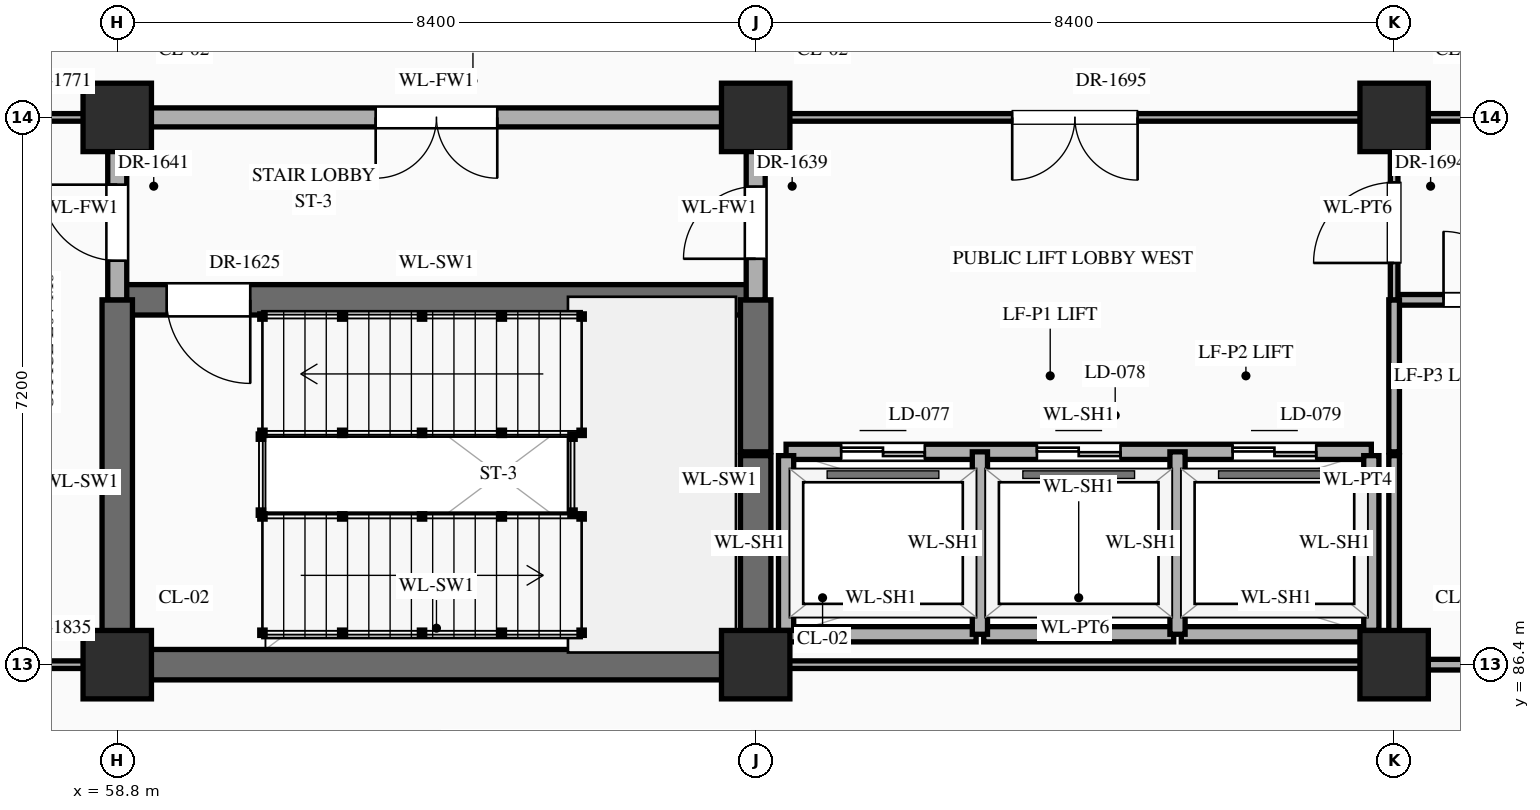
"""IFC4 building model, lengths in metres.
Left out: names, types, materials, properties, quantities, classifications, styles, units other than length and angle.
Written with IfcOpenShell. Run it as: python <this file> out.ifc"""

import sys

from ifc_helpers import new_model, si_unit, direction, frame, frame_2d, origin, origin_2d, place, context, subcontext, project, spatial, rectangle, extrude, element, fill, save


model = new_model("IFC4")
c1 = context("Model", 3, precision=1e-05, world=origin(), true_north=direction((0.0, 1.0)))
c2 = subcontext(c1, "Body", "Model", "MODEL_VIEW")
j1 = project(units=[si_unit("LENGTHUNIT", "METRE"), si_unit("PLANEANGLEUNIT", "RADIAN")], contexts=[c1])
p1 = place(None, origin())
s1 = spatial("IfcSite", under=j1, at=p1, CompositionType="ELEMENT")
p2 = place(p1, origin())
s2 = spatial("IfcBuilding", under=s1, at=p2, CompositionType="ELEMENT")
p3 = place(p2, frame((0.0, 0.0, 16.2)))
s3 = spatial("IfcBuildingStorey", under=s2, at=p3, CompositionType="ELEMENT", Elevation=16.2)
for number, where, z_axis, x_axis in (
    (1, (58.8, 86.4, 0.0), (0.0, 0.0, 1.0), (1.0, 0.0, 0.0)),
    (2, (58.8, 93.6, 0.0), (0.0, 0.0, 1.0), (1.0, 0.0, 0.0)),
    (3, (67.2, 86.4, 0.0), (0.0, 0.0, 1.0), (1.0, 0.0, 0.0)),
    (4, (67.2, 93.6, 0.0), (0.0, 0.0, 1.0), (1.0, 0.0, 0.0)),
    (5, (75.6, 86.4, 0.0), (0.0, 0.0, 1.0), (1.0, 0.0, 0.0)),
    (6, (75.6, 93.6, 0.0), (0.0, 0.0, 1.0), (1.0, 0.0, 0.0)),
):
    element("IfcColumn", number, at=place(p3, frame(where, z_axis=z_axis, x_axis=x_axis)), inside=s3, PredefinedType="COLUMN", context=c2, shape_type="SweptSolid", body=[
        extrude(rectangle(XDim=0.9, YDim=0.9, at=origin_2d()), origin(), (0.0, 0.0, 1.0), 5.4),
    ])
p4 = place(p3, frame((50.4, 86.4, 0.0), z_axis=(0.0, 0.0, 1.0), x_axis=(1.0, 0.0, 0.0)))
e7 = element("IfcWall", 7, at=p4, inside=s3, PredefinedType="STANDARD", context=c2, shape_type="SweptSolid", body=[
    extrude(rectangle(XDim=8.4, YDim=0.1, at=frame_2d((4.2, 0.0))), origin(), (0.0, 0.0, 1.0), 4.27),
])
p5 = place(p4, frame((1.135, 0.0, 0.0)))
e8 = element("IfcOpeningElement", 8, at=p5, cuts=e7, PredefinedType="OPENING", context=c2, shape_type="SweptSolid", body=[
    extrude(rectangle(XDim=0.9, YDim=2.15, at=frame_2d((0.45, 1.075))), frame((0.0, 0.062, 0.0), z_axis=(0.0, -1.0, 0.0), x_axis=(1.0, 0.0, 0.0)), (0.0, 0.0, 1.0), 0.124),
])
p6 = place(p4, frame((3.74, 0.0, 0.0)))
e9 = element("IfcOpeningElement", 9, at=p6, cuts=e7, PredefinedType="OPENING", context=c2, shape_type="SweptSolid", body=[
    extrude(rectangle(XDim=0.92, YDim=2.15, at=frame_2d((0.46, 1.075))), frame((0.0, 0.062, 0.0), z_axis=(0.0, -1.0, 0.0), x_axis=(1.0, 0.0, 0.0)), (0.0, 0.0, 1.0), 0.124),
])
p7 = place(p4, frame((6.335, 0.0, 0.0)))
e10 = element("IfcOpeningElement", 10, at=p7, cuts=e7, PredefinedType="OPENING", context=c2, shape_type="SweptSolid", body=[
    extrude(rectangle(XDim=0.96, YDim=2.2, at=frame_2d((0.48, 1.1))), frame((0.0, 0.062, 0.0), z_axis=(0.0, -1.0, 0.0), x_axis=(1.0, 0.0, 0.0)), (0.0, 0.0, 1.0), 0.124),
])
p8 = place(p3, frame((58.8, 86.4, 0.0), z_axis=(0.0, 0.0, 1.0), x_axis=(1.0, 0.0, 0.0)))
e11 = element("IfcWall", 11, at=p8, inside=s3, PredefinedType="SHEAR", context=c2, shape_type="SweptSolid", body=[
    extrude(rectangle(XDim=8.4, YDim=0.4, at=frame_2d((4.2, 0.0))), origin(), (0.0, 0.0, 1.0), 5.12),
])
p9 = place(p3, frame((67.25, 86.4, 0.0), z_axis=(0.0, 0.0, 1.0), x_axis=(1.0, 0.0, 0.0)))
e12 = element("IfcWall", 12, at=p9, inside=s3, PredefinedType="STANDARD", context=c2, shape_type="SweptSolid", body=[
    extrude(rectangle(XDim=8.3, YDim=0.1, at=frame_2d((4.15, 0.0))), origin(), (0.0, 0.0, 1.0), 4.27),
])
p10 = place(p3, frame((75.6, 86.4, 0.0), z_axis=(0.0, 0.0, 1.0), x_axis=(1.0, 0.0, 0.0)))
e13 = element("IfcWall", 13, at=p10, inside=s3, PredefinedType="STANDARD", context=c2, shape_type="SweptSolid", body=[
    extrude(rectangle(XDim=8.4, YDim=0.14, at=frame_2d((4.2, 0.0))), origin(), (0.0, 0.0, 1.0), 4.27),
])
for number, where, z_axis, x_axis in (
    (14, (67.6, 86.8, 0.0), (0.0, 0.0, 1.0), (1.0, 0.0, 0.0)),
    (15, (70.2, 86.8, 0.0), (0.0, 0.0, 1.0), (1.0, 0.0, 0.0)),
    (16, (72.8, 86.8, 0.0), (0.0, 0.0, 1.0), (1.0, 0.0, 0.0)),
):
    element("IfcWall", number, at=place(p3, frame(where, z_axis=z_axis, x_axis=x_axis)), inside=s3, PredefinedType="STANDARD", context=c2, shape_type="SweptSolid", body=[
        extrude(rectangle(XDim=2.5, YDim=0.2, at=frame_2d((1.25, 0.0))), origin(), (0.0, 0.0, 1.0), 5.12),
    ])
p11 = place(p3, frame((67.6, 89.2, 0.0), z_axis=(0.0, 0.0, 1.0), x_axis=(1.0, 0.0, 0.0)))
e17 = element("IfcWall", 17, at=p11, inside=s3, PredefinedType="STANDARD", context=c2, shape_type="SweptSolid", body=[
    extrude(rectangle(XDim=7.7, YDim=0.2, at=frame_2d((3.85, 0.0))), origin(), (0.0, 0.0, 1.0), 5.12),
])
p12 = place(p11, frame((0.725, 0.0, 0.0)))
e18 = element("IfcOpeningElement", 18, at=p12, cuts=e17, PredefinedType="OPENING", context=c2, shape_type="SweptSolid", body=[
    extrude(rectangle(XDim=1.1, YDim=2.15, at=frame_2d((0.55, 1.075))), frame((0.0, 0.112, 0.0), z_axis=(0.0, -1.0, 0.0), x_axis=(1.0, 0.0, 0.0)), (0.0, 0.0, 1.0), 0.224),
])
p13 = place(p11, frame((3.3, 0.0, 0.0)))
e19 = element("IfcOpeningElement", 19, at=p13, cuts=e17, PredefinedType="OPENING", context=c2, shape_type="SweptSolid", body=[
    extrude(rectangle(XDim=1.1, YDim=2.15, at=frame_2d((0.55, 1.075))), frame((0.0, 0.112, 0.0), z_axis=(0.0, -1.0, 0.0), x_axis=(1.0, 0.0, 0.0)), (0.0, 0.0, 1.0), 0.224),
])
p14 = place(p11, frame((5.875, 0.0, 0.0)))
e20 = element("IfcOpeningElement", 20, at=p14, cuts=e17, PredefinedType="OPENING", context=c2, shape_type="SweptSolid", body=[
    extrude(rectangle(XDim=1.1, YDim=2.15, at=frame_2d((0.55, 1.075))), frame((0.0, 0.112, 0.0), z_axis=(0.0, -1.0, 0.0), x_axis=(1.0, 0.0, 0.0)), (0.0, 0.0, 1.0), 0.224),
])
p15 = place(p3, frame((58.8, 91.2, 0.0), z_axis=(0.0, 0.0, 1.0), x_axis=(1.0, 0.0, 0.0)))
e21 = element("IfcWall", 21, at=p15, inside=s3, PredefinedType="SHEAR", context=c2, shape_type="SweptSolid", body=[
    extrude(rectangle(XDim=8.4, YDim=0.4, at=frame_2d((4.2, 0.0))), origin(), (0.0, 0.0, 1.0), 5.12),
])
p16 = place(p15, frame((0.65, 0.0, 0.0)))
e22 = element("IfcOpeningElement", 22, at=p16, cuts=e21, PredefinedType="OPENING", context=c2, shape_type="SweptSolid", body=[
    extrude(rectangle(XDim=1.1, YDim=2.2, at=frame_2d((0.55, 1.1))), frame((0.0, 0.212, 0.0), z_axis=(0.0, -1.0, 0.0), x_axis=(1.0, 0.0, 0.0)), (0.0, 0.0, 1.0), 0.424),
])
p17 = place(p3, frame((75.6, 91.2, 0.0), z_axis=(0.0, 0.0, 1.0), x_axis=(1.0, 0.0, 0.0)))
e23 = element("IfcWall", 23, at=p17, inside=s3, PredefinedType="STANDARD", context=c2, shape_type="SweptSolid", body=[
    extrude(rectangle(XDim=8.4, YDim=0.14, at=frame_2d((4.2, 0.0))), origin(), (0.0, 0.0, 1.0), 5.12),
])
p18 = place(p17, frame((0.65, 0.0, 0.0)))
e24 = element("IfcOpeningElement", 24, at=p18, cuts=e23, PredefinedType="OPENING", context=c2, shape_type="SweptSolid", body=[
    extrude(rectangle(XDim=0.9, YDim=2.15, at=frame_2d((0.45, 1.075))), frame((0.0, 0.082, 0.0), z_axis=(0.0, -1.0, 0.0), x_axis=(1.0, 0.0, 0.0)), (0.0, 0.0, 1.0), 0.164),
])
p19 = place(p17, frame((3.22, 0.0, 0.0)))
e25 = element("IfcOpeningElement", 25, at=p19, cuts=e23, PredefinedType="OPENING", context=c2, shape_type="SweptSolid", body=[
    extrude(rectangle(XDim=0.86, YDim=2.1, at=frame_2d((0.43, 1.05))), frame((0.0, 0.082, 0.0), z_axis=(0.0, -1.0, 0.0), x_axis=(1.0, 0.0, 0.0)), (0.0, 0.0, 1.0), 0.164),
])
p20 = place(p17, frame((6.32, 0.0, 0.0)))
e26 = element("IfcOpeningElement", 26, at=p20, cuts=e23, PredefinedType="OPENING", context=c2, shape_type="SweptSolid", body=[
    extrude(rectangle(XDim=0.86, YDim=2.1, at=frame_2d((0.43, 1.05))), frame((0.0, 0.082, 0.0), z_axis=(0.0, -1.0, 0.0), x_axis=(1.0, 0.0, 0.0)), (0.0, 0.0, 1.0), 0.164),
])
p21 = place(p3, frame((50.4, 93.6, 0.0), z_axis=(0.0, 0.0, 1.0), x_axis=(1.0, 0.0, 0.0)))
e27 = element("IfcWall", 27, at=p21, inside=s3, PredefinedType="STANDARD", context=c2, shape_type="SweptSolid", body=[
    extrude(rectangle(XDim=8.4, YDim=0.1, at=frame_2d((4.2, 0.0))), origin(), (0.0, 0.0, 1.0), 4.27),
])
p22 = place(p21, frame((1.065, 0.0, 0.0)))
e28 = element("IfcOpeningElement", 28, at=p22, cuts=e27, PredefinedType="OPENING", context=c2, shape_type="SweptSolid", body=[
    extrude(rectangle(XDim=1.04, YDim=2.2, at=frame_2d((0.52, 1.1))), frame((0.0, 0.062, 0.0), z_axis=(0.0, -1.0, 0.0), x_axis=(1.0, 0.0, 0.0)), (0.0, 0.0, 1.0), 0.124),
])
p23 = place(p21, frame((3.66, 0.0, 0.0)))
e29 = element("IfcOpeningElement", 29, at=p23, cuts=e27, PredefinedType="OPENING", context=c2, shape_type="SweptSolid", body=[
    extrude(rectangle(XDim=1.08, YDim=2.25, at=frame_2d((0.54, 1.125))), frame((0.0, 0.062, 0.0), z_axis=(0.0, -1.0, 0.0), x_axis=(1.0, 0.0, 0.0)), (0.0, 0.0, 1.0), 0.124),
])
p24 = place(p21, frame((6.255, 0.0, 0.0)))
e30 = element("IfcOpeningElement", 30, at=p24, cuts=e27, PredefinedType="OPENING", context=c2, shape_type="SweptSolid", body=[
    extrude(rectangle(XDim=1.12, YDim=2.25, at=frame_2d((0.56, 1.125))), frame((0.0, 0.062, 0.0), z_axis=(0.0, -1.0, 0.0), x_axis=(1.0, 0.0, 0.0)), (0.0, 0.0, 1.0), 0.124),
])
p25 = place(p3, frame((58.8, 93.6, 0.0), z_axis=(0.0, 0.0, 1.0), x_axis=(1.0, 0.0, 0.0)))
e31 = element("IfcWall", 31, at=p25, inside=s3, PredefinedType="STANDARD", context=c2, shape_type="SweptSolid", body=[
    extrude(rectangle(XDim=8.4, YDim=0.25, at=frame_2d((4.2, 0.0))), origin(), (0.0, 0.0, 1.0), 4.27),
])
p26 = place(p25, frame((3.4, 0.0, 0.0)))
e32 = element("IfcOpeningElement", 32, at=p26, cuts=e31, PredefinedType="OPENING", context=c2, shape_type="SweptSolid", body=[
    extrude(rectangle(XDim=1.6, YDim=2.3, at=frame_2d((0.8, 1.15))), frame((0.0, 0.137, 0.0), z_axis=(0.0, -1.0, 0.0), x_axis=(1.0, 0.0, 0.0)), (0.0, 0.0, 1.0), 0.274),
])
p27 = place(p3, frame((67.2, 93.6, 0.0), z_axis=(0.0, 0.0, 1.0), x_axis=(1.0, 0.0, 0.0)))
e33 = element("IfcWall", 33, at=p27, inside=s3, PredefinedType="STANDARD", context=c2, shape_type="SweptSolid", body=[
    extrude(rectangle(XDim=33.6, YDim=0.1, at=frame_2d((16.8, 0.0))), origin(), (0.0, 0.0, 1.0), 4.27),
])
p28 = place(p27, frame((3.375, 0.0, 0.0)))
e34 = element("IfcOpeningElement", 34, at=p28, cuts=e33, PredefinedType="OPENING", context=c2, shape_type="SweptSolid", body=[
    extrude(rectangle(XDim=1.65, YDim=2.4, at=frame_2d((0.825, 1.2))), frame((0.0, 0.062, 0.0), z_axis=(0.0, -1.0, 0.0), x_axis=(1.0, 0.0, 0.0)), (0.0, 0.0, 1.0), 0.124),
])
p29 = place(p27, frame((28.625, 0.0, 0.0)))
e35 = element("IfcOpeningElement", 35, at=p29, cuts=e33, PredefinedType="OPENING", context=c2, shape_type="SweptSolid", body=[
    extrude(rectangle(XDim=1.55, YDim=2.35, at=frame_2d((0.775, 1.175))), frame((0.0, 0.062, 0.0), z_axis=(0.0, -1.0, 0.0), x_axis=(1.0, 0.0, 0.0)), (0.0, 0.0, 1.0), 0.124),
])
p30 = place(p27, frame((11.65, 0.0, 0.0)))
e36 = element("IfcOpeningElement", 36, at=p30, cuts=e33, PredefinedType="OPENING", context=c2, shape_type="SweptSolid", body=[
    extrude(rectangle(XDim=1.9, YDim=2.5, at=frame_2d((0.95, 1.25))), frame((0.0, 0.062, 0.0), z_axis=(0.0, -1.0, 0.0), x_axis=(1.0, 0.0, 0.0)), (0.0, 0.0, 1.0), 0.124),
])
p31 = place(p27, frame((17.935, 0.0, 0.0)))
e37 = element("IfcOpeningElement", 37, at=p31, cuts=e33, PredefinedType="OPENING", context=c2, shape_type="SweptSolid", body=[
    extrude(rectangle(XDim=0.9, YDim=2.15, at=frame_2d((0.45, 1.075))), frame((0.0, 0.062, 0.0), z_axis=(0.0, -1.0, 0.0), x_axis=(1.0, 0.0, 0.0)), (0.0, 0.0, 1.0), 0.124),
])
p32 = place(p27, frame((20.57, 0.0, 0.0)))
e38 = element("IfcOpeningElement", 38, at=p32, cuts=e33, PredefinedType="OPENING", context=c2, shape_type="SweptSolid", body=[
    extrude(rectangle(XDim=0.86, YDim=2.1, at=frame_2d((0.43, 1.05))), frame((0.0, 0.062, 0.0), z_axis=(0.0, -1.0, 0.0), x_axis=(1.0, 0.0, 0.0)), (0.0, 0.0, 1.0), 0.124),
])
p33 = place(p27, frame((23.155, 0.0, 0.0)))
e39 = element("IfcOpeningElement", 39, at=p33, cuts=e33, PredefinedType="OPENING", context=c2, shape_type="SweptSolid", body=[
    extrude(rectangle(XDim=0.92, YDim=2.15, at=frame_2d((0.46, 1.075))), frame((0.0, 0.062, 0.0), z_axis=(0.0, -1.0, 0.0), x_axis=(1.0, 0.0, 0.0)), (0.0, 0.0, 1.0), 0.124),
])
p34 = place(p3, frame((58.8, 86.4, 0.0), z_axis=(0.0, 0.0, 1.0), x_axis=(0.0, 1.0, 0.0)))
e40 = element("IfcWall", 40, at=p34, inside=s3, PredefinedType="SHEAR", context=c2, shape_type="SweptSolid", body=[
    extrude(rectangle(XDim=4.8, YDim=0.4, at=frame_2d((2.4, 0.0))), origin(), (0.0, 0.0, 1.0), 5.12),
])
p35 = place(p3, frame((58.8, 91.2, 0.0), z_axis=(0.0, 0.0, 1.0), x_axis=(0.0, 1.0, 0.0)))
e41 = element("IfcWall", 41, at=p35, inside=s3, PredefinedType="STANDARD", context=c2, shape_type="SweptSolid", body=[
    extrude(rectangle(XDim=2.4, YDim=0.25, at=frame_2d((1.2, 0.0))), origin(), (0.0, 0.0, 1.0), 4.37),
])
p36 = place(p35, frame((0.515, 0.0, 0.0)))
e42 = element("IfcOpeningElement", 42, at=p36, cuts=e41, PredefinedType="OPENING", context=c2, shape_type="SweptSolid", body=[
    extrude(rectangle(XDim=1.0, YDim=2.2, at=frame_2d((0.5, 1.1))), frame((0.0, 0.137, 0.0), z_axis=(0.0, -1.0, 0.0), x_axis=(1.0, 0.0, 0.0)), (0.0, 0.0, 1.0), 0.274),
])
p37 = place(p3, frame((67.2, 86.45, 0.0), z_axis=(0.0, 0.0, 1.0), x_axis=(0.0, 1.0, 0.0)))
e43 = element("IfcWall", 43, at=p37, inside=s3, PredefinedType="SHEAR", context=c2, shape_type="SweptSolid", body=[
    extrude(rectangle(XDim=2.7, YDim=0.4, at=frame_2d((1.35, 0.0))), origin(), (0.0, 0.0, 1.0), 5.12),
])
p38 = place(p3, frame((67.2, 89.2, 0.0), z_axis=(0.0, 0.0, 1.0), x_axis=(0.0, 1.0, 0.0)))
e44 = element("IfcWall", 44, at=p38, inside=s3, PredefinedType="SHEAR", context=c2, shape_type="SweptSolid", body=[
    extrude(rectangle(XDim=2.0, YDim=0.4, at=frame_2d((1.0, 0.0))), origin(), (0.0, 0.0, 1.0), 5.12),
])
p39 = place(p3, frame((67.2, 91.2, 0.0), z_axis=(0.0, 0.0, 1.0), x_axis=(0.0, 1.0, 0.0)))
e45 = element("IfcWall", 45, at=p39, inside=s3, PredefinedType="STANDARD", context=c2, shape_type="SweptSolid", body=[
    extrude(rectangle(XDim=2.4, YDim=0.25, at=frame_2d((1.2, 0.0))), origin(), (0.0, 0.0, 1.0), 4.37),
])
p40 = place(p39, frame((0.54, 0.0, 0.0)))
e46 = element("IfcOpeningElement", 46, at=p40, cuts=e45, PredefinedType="OPENING", context=c2, shape_type="SweptSolid", body=[
    extrude(rectangle(XDim=0.95, YDim=2.15, at=frame_2d((0.475, 1.075))), frame((0.0, 0.137, 0.0), z_axis=(0.0, -1.0, 0.0), x_axis=(1.0, 0.0, 0.0)), (0.0, 0.0, 1.0), 0.274),
])
p41 = place(p3, frame((67.6, 86.85, 0.0), z_axis=(0.0, 0.0, 1.0), x_axis=(0.0, 1.0, 0.0)))
e47 = element("IfcWall", 47, at=p41, inside=s3, PredefinedType="STANDARD", context=c2, shape_type="SweptSolid", body=[
    extrude(rectangle(XDim=2.3, YDim=0.2, at=frame_2d((1.15, 0.0))), origin(), (0.0, 0.0, 1.0), 5.12),
])
for number, where, z_axis, x_axis in (
    (48, (70.15, 86.8, 0.0), (0.0, 0.0, 1.0), (0.0, 1.0, 0.0)),
    (49, (72.75, 86.8, 0.0), (0.0, 0.0, 1.0), (0.0, 1.0, 0.0)),
):
    element("IfcWall", number, at=place(p3, frame(where, z_axis=z_axis, x_axis=x_axis)), inside=s3, PredefinedType="STANDARD", context=c2, shape_type="SweptSolid", body=[
        extrude(rectangle(XDim=2.4, YDim=0.2, at=frame_2d((1.2, 0.0))), origin(), (0.0, 0.0, 1.0), 5.12),
    ])
p42 = place(p3, frame((75.3, 86.85, 0.0), z_axis=(0.0, 0.0, 1.0), x_axis=(0.0, 1.0, 0.0)))
e50 = element("IfcWall", 50, at=p42, inside=s3, PredefinedType="STANDARD", context=c2, shape_type="SweptSolid", body=[
    extrude(rectangle(XDim=2.3, YDim=0.2, at=frame_2d((1.15, 0.0))), origin(), (0.0, 0.0, 1.0), 5.12),
])
p43 = place(p3, frame((75.6, 86.45, 0.0), z_axis=(0.0, 0.0, 1.0), x_axis=(0.0, 1.0, 0.0)))
e51 = element("IfcWall", 51, at=p43, inside=s3, PredefinedType="STANDARD", context=c2, shape_type="SweptSolid", body=[
    extrude(rectangle(XDim=2.7, YDim=0.14, at=frame_2d((1.35, 0.0))), origin(), (0.0, 0.0, 1.0), 4.37),
])
p44 = place(p3, frame((75.6, 89.2, 0.0), z_axis=(0.0, 0.0, 1.0), x_axis=(0.0, 1.0, 0.0)))
e52 = element("IfcWall", 52, at=p44, inside=s3, PredefinedType="STANDARD", context=c2, shape_type="SweptSolid", body=[
    extrude(rectangle(XDim=2.0, YDim=0.14, at=frame_2d((1.0, 0.0))), origin(), (0.0, 0.0, 1.0), 4.37),
])
p45 = place(p3, frame((75.6, 91.2, 0.0), z_axis=(0.0, 0.0, 1.0), x_axis=(0.0, 1.0, 0.0)))
e53 = element("IfcWall", 53, at=p45, inside=s3, PredefinedType="STANDARD", context=c2, shape_type="SweptSolid", body=[
    extrude(rectangle(XDim=2.4, YDim=0.1, at=frame_2d((1.2, 0.0))), origin(), (0.0, 0.0, 1.0), 4.37),
])
p46 = place(p45, frame((0.485, 0.0, 0.0)))
e54 = element("IfcOpeningElement", 54, at=p46, cuts=e53, PredefinedType="OPENING", context=c2, shape_type="SweptSolid", body=[
    extrude(rectangle(XDim=1.06, YDim=2.4, at=frame_2d((0.53, 1.2))), frame((0.0, 0.062, 0.0), z_axis=(0.0, -1.0, 0.0), x_axis=(1.0, 0.0, 0.0)), (0.0, 0.0, 1.0), 0.124),
])
p47 = place(p12, origin())
e55 = element("IfcDoor", 55, at=p47, inside=s3, OperationType="DOUBLE_DOOR_SLIDING", PredefinedType="DOOR", context=c2, shape_type="SweptSolid", body=[
    extrude(rectangle(XDim=1.1, YDim=2.15, at=frame_2d((0.55, 1.075))), frame((0.0, 0.025, 0.0), z_axis=(0.0, -1.0, 0.0), x_axis=(1.0, 0.0, 0.0)), (0.0, 0.0, 1.0), 0.05),
])
fill(e18, e55)
p48 = place(p13, origin())
e56 = element("IfcDoor", 56, at=p48, inside=s3, OperationType="DOUBLE_DOOR_SLIDING", PredefinedType="DOOR", context=c2, shape_type="SweptSolid", body=[
    extrude(rectangle(XDim=1.1, YDim=2.15, at=frame_2d((0.55, 1.075))), frame((0.0, 0.025, 0.0), z_axis=(0.0, -1.0, 0.0), x_axis=(1.0, 0.0, 0.0)), (0.0, 0.0, 1.0), 0.05),
])
fill(e19, e56)
p49 = place(p14, origin())
e57 = element("IfcDoor", 57, at=p49, inside=s3, OperationType="DOUBLE_DOOR_SLIDING", PredefinedType="DOOR", context=c2, shape_type="SweptSolid", body=[
    extrude(rectangle(XDim=1.1, YDim=2.15, at=frame_2d((0.55, 1.075))), frame((0.0, 0.025, 0.0), z_axis=(0.0, -1.0, 0.0), x_axis=(1.0, 0.0, 0.0)), (0.0, 0.0, 1.0), 0.05),
])
fill(e20, e57)
p50 = place(p16, frame((1.1, 0.0, 0.0), z_axis=(0.0, 0.0, 1.0), x_axis=(-1.0, 0.0, 0.0)))
e58 = element("IfcDoor", 58, at=p50, inside=s3, OperationType="SINGLE_SWING_LEFT", PredefinedType="DOOR", context=c2, shape_type="SweptSolid", body=[
    extrude(rectangle(XDim=1.1, YDim=2.2, at=frame_2d((0.55, 1.1))), frame((0.0, 0.025, 0.0), z_axis=(0.0, -1.0, 0.0), x_axis=(1.0, 0.0, 0.0)), (0.0, 0.0, 1.0), 0.05),
])
fill(e22, e58)
p51 = place(p40, origin())
e59 = element("IfcDoor", 59, at=p51, inside=s3, OperationType="SINGLE_SWING_LEFT", PredefinedType="DOOR", context=c2, shape_type="SweptSolid", body=[
    extrude(rectangle(XDim=0.95, YDim=2.15, at=frame_2d((0.475, 1.075))), frame((0.0, 0.025, 0.0), z_axis=(0.0, -1.0, 0.0), x_axis=(1.0, 0.0, 0.0)), (0.0, 0.0, 1.0), 0.05),
])
fill(e46, e59)
p52 = place(p26, frame((1.6, 0.0, 0.0), z_axis=(0.0, 0.0, 1.0), x_axis=(-1.0, 0.0, 0.0)))
e60 = element("IfcDoor", 60, at=p52, inside=s3, OperationType="DOUBLE_DOOR_SINGLE_SWING", PredefinedType="DOOR", context=c2, shape_type="SweptSolid", body=[
    extrude(rectangle(XDim=1.6, YDim=2.3, at=frame_2d((0.8, 1.15))), frame((0.0, 0.025, 0.0), z_axis=(0.0, -1.0, 0.0), x_axis=(1.0, 0.0, 0.0)), (0.0, 0.0, 1.0), 0.05),
])
fill(e32, e60)
p53 = place(p36, origin())
e61 = element("IfcDoor", 61, at=p53, inside=s3, OperationType="SINGLE_SWING_RIGHT", PredefinedType="DOOR", context=c2, shape_type="SweptSolid", body=[
    extrude(rectangle(XDim=1.0, YDim=2.2, at=frame_2d((0.5, 1.1))), frame((0.0, 0.025, 0.0), z_axis=(0.0, -1.0, 0.0), x_axis=(1.0, 0.0, 0.0)), (0.0, 0.0, 1.0), 0.05),
])
fill(e42, e61)
p54 = place(p46, origin())
e62 = element("IfcDoor", 62, at=p54, inside=s3, OperationType="SINGLE_SWING_LEFT", PredefinedType="DOOR", context=c2, shape_type="SweptSolid", body=[
    extrude(rectangle(XDim=1.06, YDim=2.4, at=frame_2d((0.53, 1.2))), frame((0.0, 0.025, 0.0), z_axis=(0.0, -1.0, 0.0), x_axis=(1.0, 0.0, 0.0)), (0.0, 0.0, 1.0), 0.05),
])
fill(e54, e62)
p55 = place(p28, frame((1.65, 0.0, 0.0), z_axis=(0.0, 0.0, 1.0), x_axis=(-1.0, 0.0, 0.0)))
e63 = element("IfcDoor", 63, at=p55, inside=s3, OperationType="DOUBLE_DOOR_SINGLE_SWING", PredefinedType="DOOR", context=c2, shape_type="SweptSolid", body=[
    extrude(rectangle(XDim=1.65, YDim=2.4, at=frame_2d((0.825, 1.2))), frame((0.0, 0.025, 0.0), z_axis=(0.0, -1.0, 0.0), x_axis=(1.0, 0.0, 0.0)), (0.0, 0.0, 1.0), 0.05),
])
fill(e34, e63)
p56 = place(p18, origin())
e64 = element("IfcDoor", 64, at=p56, inside=s3, OperationType="SINGLE_SWING_LEFT", PredefinedType="DOOR", context=c2, shape_type="SweptSolid", body=[
    extrude(rectangle(XDim=0.9, YDim=2.15, at=frame_2d((0.45, 1.075))), frame((0.0, 0.025, 0.0), z_axis=(0.0, -1.0, 0.0), x_axis=(1.0, 0.0, 0.0)), (0.0, 0.0, 1.0), 0.05),
])
fill(e24, e64)
save(model, sys.argv[1])
